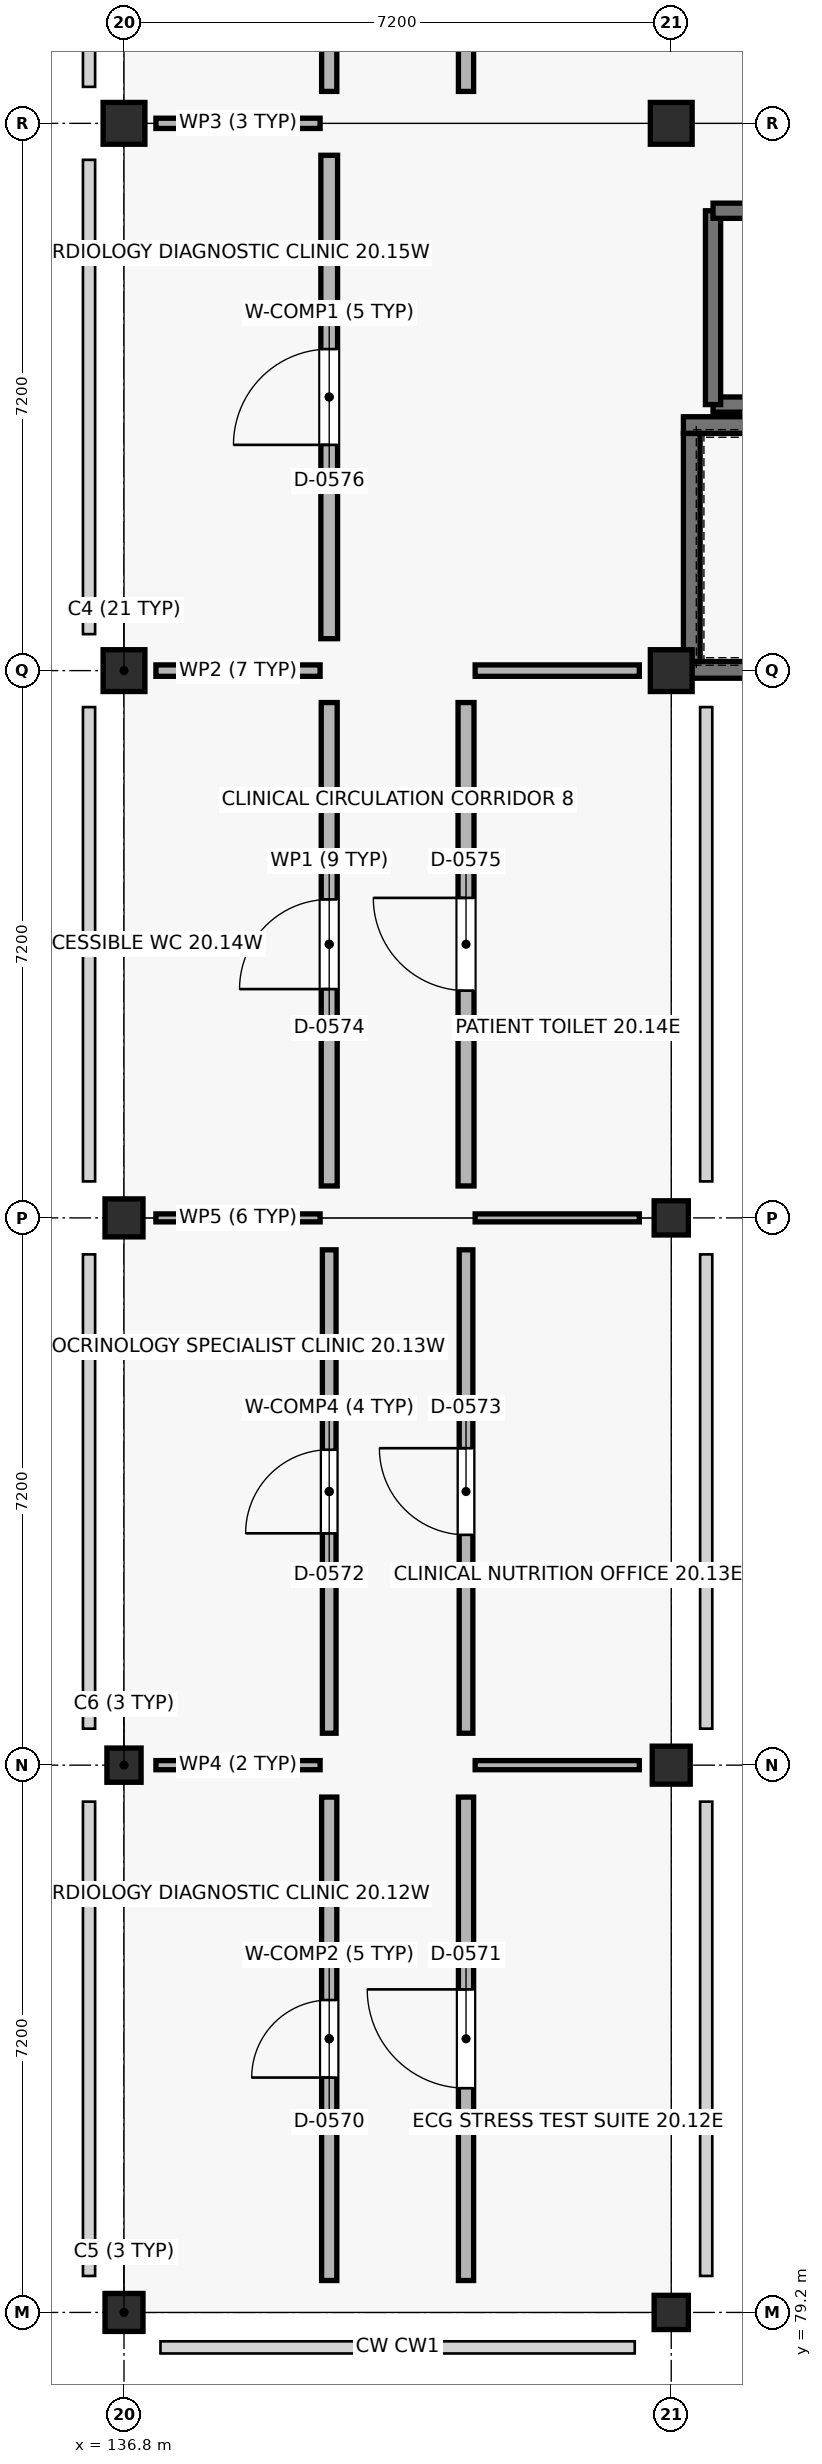
"""IFC4 building model, lengths in metres.
Left out: names, types, materials, properties, quantities, classifications, styles, units other than length and angle.
Written with IfcOpenShell. Run it as: python <this file> out.ifc"""

import sys

from ifc_helpers import new_model, si_unit, direction, frame, frame_2d, origin, origin_2d, place, context, subcontext, project, spatial, rectangle, extrude, element, fill, save


model = new_model("IFC4")
c1 = context("Model", 3, precision=1e-05, world=origin(), true_north=direction((0.0, 1.0)))
c2 = subcontext(c1, "Body", "Model", "MODEL_VIEW")
j1 = project(units=[si_unit("LENGTHUNIT", "METRE"), si_unit("PLANEANGLEUNIT", "RADIAN")], contexts=[c1])
p1 = place(None, origin())
s1 = spatial("IfcSite", under=j1, at=p1, CompositionType="ELEMENT")
p2 = place(p1, origin())
s2 = spatial("IfcBuilding", under=s1, at=p2, CompositionType="ELEMENT")
p3 = place(p2, frame((0.0, 0.0, 13.5)))
s3 = spatial("IfcBuildingStorey", under=s2, at=p3, CompositionType="ELEMENT", Elevation=13.5)
p4 = place(p3, frame((136.8, 79.2, 0.0), z_axis=(0.0, 0.0, 1.0), x_axis=(1.0, 0.0, 0.0)))
e1 = element("IfcColumn", 1, at=p4, inside=s3, PredefinedType="COLUMN", context=c2, shape_type="SweptSolid", body=[
    extrude(rectangle(XDim=0.5, YDim=0.5, at=origin_2d()), origin(), (0.0, 0.0, 1.0), 3.83),
])
p5 = place(p3, frame((136.8, 86.4, 0.0), z_axis=(0.0, 0.0, 1.0), x_axis=(1.0, 0.0, 0.0)))
e2 = element("IfcColumn", 2, at=p5, inside=s3, PredefinedType="COLUMN", context=c2, shape_type="SweptSolid", body=[
    extrude(rectangle(XDim=0.45, YDim=0.45, at=origin_2d()), origin(), (0.0, 0.0, 1.0), 3.83),
])
p6 = place(p3, frame((136.8, 93.6, 0.0), z_axis=(0.0, 0.0, 1.0), x_axis=(1.0, 0.0, 0.0)))
e3 = element("IfcColumn", 3, at=p6, inside=s3, PredefinedType="COLUMN", context=c2, shape_type="SweptSolid", body=[
    extrude(rectangle(XDim=0.5, YDim=0.5, at=origin_2d()), origin(), (0.0, 0.0, 1.0), 3.83),
])
for number, where, z_axis, x_axis in (
    (4, (136.8, 100.8, 0.0), (0.0, 0.0, 1.0), (1.0, 0.0, 0.0)),
    (5, (136.8, 108.0, 0.0), (0.0, 0.0, 1.0), (1.0, 0.0, 0.0)),
):
    element("IfcColumn", number, at=place(p3, frame(where, z_axis=z_axis, x_axis=x_axis)), inside=s3, PredefinedType="COLUMN", context=c2, shape_type="SweptSolid", body=[
        extrude(rectangle(XDim=0.55, YDim=0.55, at=origin_2d()), origin(), (0.0, 0.0, 1.0), 4.05),
    ])
p7 = place(p3, frame((144.0, 79.2, 0.0), z_axis=(0.0, 0.0, 1.0), x_axis=(1.0, 0.0, 0.0)))
e6 = element("IfcColumn", 6, at=p7, inside=s3, PredefinedType="COLUMN", context=c2, shape_type="SweptSolid", body=[
    extrude(rectangle(XDim=0.45, YDim=0.45, at=origin_2d()), origin(), (0.0, 0.0, 1.0), 3.83),
])
p8 = place(p3, frame((144.0, 86.4, 0.0), z_axis=(0.0, 0.0, 1.0), x_axis=(1.0, 0.0, 0.0)))
e7 = element("IfcColumn", 7, at=p8, inside=s3, PredefinedType="COLUMN", context=c2, shape_type="SweptSolid", body=[
    extrude(rectangle(XDim=0.5, YDim=0.5, at=origin_2d()), origin(), (0.0, 0.0, 1.0), 3.83),
])
p9 = place(p3, frame((144.0, 93.6, 0.0), z_axis=(0.0, 0.0, 1.0), x_axis=(1.0, 0.0, 0.0)))
e8 = element("IfcColumn", 8, at=p9, inside=s3, PredefinedType="COLUMN", context=c2, shape_type="SweptSolid", body=[
    extrude(rectangle(XDim=0.45, YDim=0.45, at=origin_2d()), origin(), (0.0, 0.0, 1.0), 3.83),
])
for number, where, z_axis, x_axis in (
    (9, (144.0, 100.8, 0.0), (0.0, 0.0, 1.0), (1.0, 0.0, 0.0)),
    (10, (144.0, 108.0, 0.0), (0.0, 0.0, 1.0), (1.0, 0.0, 0.0)),
):
    element("IfcColumn", number, at=place(p3, frame(where, z_axis=z_axis, x_axis=x_axis)), inside=s3, PredefinedType="COLUMN", context=c2, shape_type="SweptSolid", body=[
        extrude(rectangle(XDim=0.55, YDim=0.55, at=origin_2d()), origin(), (0.0, 0.0, 1.0), 4.05),
    ])
p10 = place(p3, frame((144.16, 100.81, 0.0), z_axis=(0.0, 0.0, 1.0), x_axis=(1.0, 0.0, 0.0)))
e11 = element("IfcWall", 11, at=p10, inside=s3, PredefinedType="SHEAR", context=c2, shape_type="SweptSolid", body=[
    extrude(rectangle(XDim=6.88, YDim=0.22, at=frame_2d((3.44, 0.0))), origin(), (0.0, 0.0, 1.0), 3.79),
])
p11 = place(p3, frame((144.16, 104.03, 0.0), z_axis=(0.0, 0.0, 1.0), x_axis=(1.0, 0.0, 0.0)))
e12 = element("IfcWall", 12, at=p11, inside=s3, PredefinedType="SHEAR", context=c2, shape_type="SweptSolid", body=[
    extrude(rectangle(XDim=6.88, YDim=0.22, at=frame_2d((3.44, 0.0))), origin(), (0.0, 0.0, 1.0), 3.79),
])
p12 = place(p11, frame((5.25, 0.0, 0.0)))
e13 = element("IfcOpeningElement", 13, at=p12, cuts=e12, PredefinedType="OPENING", context=c2, shape_type="SweptSolid", body=[
    extrude(rectangle(XDim=1.2, YDim=2.15, at=frame_2d((0.6, 1.075))), frame((0.0, 0.12, 0.0), z_axis=(0.0, -1.0, 0.0), x_axis=(1.0, 0.0, 0.0)), (0.0, 0.0, 1.0), 0.24),
])
p13 = place(p3, frame((144.27, 100.92, 0.0), z_axis=(0.0, 0.0, 1.0), x_axis=(0.0, 1.0, 0.0)))
e14 = element("IfcWall", 14, at=p13, inside=s3, PredefinedType="SHEAR", context=c2, shape_type="SweptSolid", body=[
    extrude(rectangle(XDim=3.0, YDim=0.22, at=frame_2d((1.5, 0.0))), origin(), (0.0, 0.0, 1.0), 3.79),
])
p14 = place(p3, frame((144.55, 104.3, 0.0), z_axis=(0.0, 0.0, 1.0), x_axis=(1.0, 0.0, 0.0)))
e15 = element("IfcWall", 15, at=p14, inside=s3, PredefinedType="SHEAR", context=c2, shape_type="SweptSolid", body=[
    extrude(rectangle(XDim=2.1, YDim=0.2, at=frame_2d((1.05, 0.0))), origin(), (0.0, 0.0, 1.0), 3.79),
])
p15 = place(p3, frame((144.55, 104.3, 0.0), z_axis=(0.0, 0.0, 1.0), x_axis=(0.0, 1.0, 0.0)))
e16 = element("IfcWall", 16, at=p15, inside=s3, PredefinedType="SHEAR", context=c2, shape_type="SweptSolid", body=[
    extrude(rectangle(XDim=2.55, YDim=0.2, at=frame_2d((1.275, 0.0))), origin(), (0.0, 0.0, 1.0), 3.79),
])
p16 = place(p3, frame((144.55, 106.85, 0.0), z_axis=(0.0, 0.0, 1.0), x_axis=(1.0, 0.0, 0.0)))
e17 = element("IfcWall", 17, at=p16, inside=s3, PredefinedType="SHEAR", context=c2, shape_type="SweptSolid", body=[
    extrude(rectangle(XDim=2.1, YDim=0.2, at=frame_2d((1.05, 0.0))), origin(), (0.0, 0.0, 1.0), 3.79),
])
p17 = place(p3, frame((139.5, 79.62, 0.0), z_axis=(0.0, 0.0, 1.0), x_axis=(0.0, 1.0, 0.0)))
e18 = element("IfcWall", 18, at=p17, inside=s3, PredefinedType="SOLIDWALL", context=c2, shape_type="SweptSolid", body=[
    extrude(rectangle(XDim=6.36, YDim=0.2, at=frame_2d((3.18, 0.0))), origin(), (0.0, 0.0, 1.0), 2.93),
])
p18 = place(p17, frame((2.67, 0.0, 0.0)))
e19 = element("IfcOpeningElement", 19, at=p18, cuts=e18, PredefinedType="OPENING", context=c2, shape_type="SweptSolid", body=[
    extrude(rectangle(XDim=1.02, YDim=2.04, at=frame_2d((0.51, 1.02))), frame((0.0, 0.11, 0.0), z_axis=(0.0, -1.0, 0.0), x_axis=(1.0, 0.0, 0.0)), (0.0, 0.0, 1.0), 0.22),
])
p19 = place(p3, frame((137.22, 86.4, 0.0), z_axis=(0.0, 0.0, 1.0), x_axis=(1.0, 0.0, 0.0)))
e20 = element("IfcWall", 20, at=p19, inside=s3, PredefinedType="PARTITIONING", context=c2, shape_type="SweptSolid", body=[
    extrude(rectangle(XDim=2.16, YDim=0.12, at=frame_2d((1.08, 0.0))), origin(), (0.0, 0.0, 1.0), 2.93),
])
p20 = place(p3, frame((141.3, 79.62, 0.0), z_axis=(0.0, 0.0, 1.0), x_axis=(0.0, 1.0, 0.0)))
e21 = element("IfcWall", 21, at=p20, inside=s3, PredefinedType="SOLIDWALL", context=c2, shape_type="SweptSolid", body=[
    extrude(rectangle(XDim=6.36, YDim=0.2, at=frame_2d((3.18, 0.0))), origin(), (0.0, 0.0, 1.0), 2.93),
])
p21 = place(p20, frame((2.53, 0.0, 0.0)))
e22 = element("IfcOpeningElement", 22, at=p21, cuts=e21, PredefinedType="OPENING", context=c2, shape_type="SweptSolid", body=[
    extrude(rectangle(XDim=1.3, YDim=2.15, at=frame_2d((0.65, 1.075))), frame((0.0, 0.11, 0.0), z_axis=(0.0, -1.0, 0.0), x_axis=(1.0, 0.0, 0.0)), (0.0, 0.0, 1.0), 0.22),
])
p22 = place(p3, frame((141.42, 86.4, 0.0), z_axis=(0.0, 0.0, 1.0), x_axis=(1.0, 0.0, 0.0)))
e23 = element("IfcWall", 23, at=p22, inside=s3, PredefinedType="PARTITIONING", context=c2, shape_type="SweptSolid", body=[
    extrude(rectangle(XDim=2.16, YDim=0.12, at=frame_2d((1.08, 0.0))), origin(), (0.0, 0.0, 1.0), 2.93),
])
p23 = place(p3, frame((139.5, 86.82, 0.0), z_axis=(0.0, 0.0, 1.0), x_axis=(0.0, 1.0, 0.0)))
e24 = element("IfcWall", 24, at=p23, inside=s3, PredefinedType="PARTITIONING", context=c2, shape_type="SweptSolid", body=[
    extrude(rectangle(XDim=6.36, YDim=0.18, at=frame_2d((3.18, 0.0))), origin(), (0.0, 0.0, 1.0), 2.93),
])
p24 = place(p23, frame((2.63, 0.0, 0.0)))
e25 = element("IfcOpeningElement", 25, at=p24, cuts=e24, PredefinedType="OPENING", context=c2, shape_type="SweptSolid", body=[
    extrude(rectangle(XDim=1.1, YDim=2.04, at=frame_2d((0.55, 1.02))), frame((0.0, 0.1, 0.0), z_axis=(0.0, -1.0, 0.0), x_axis=(1.0, 0.0, 0.0)), (0.0, 0.0, 1.0), 0.2),
])
p25 = place(p3, frame((137.22, 93.6, 0.0), z_axis=(0.0, 0.0, 1.0), x_axis=(1.0, 0.0, 0.0)))
e26 = element("IfcWall", 26, at=p25, inside=s3, PredefinedType="PARTITIONING", context=c2, shape_type="SweptSolid", body=[
    extrude(rectangle(XDim=2.16, YDim=0.105, at=frame_2d((1.08, 0.0))), origin(), (0.0, 0.0, 1.0), 2.93),
])
p26 = place(p3, frame((141.3, 86.82, 0.0), z_axis=(0.0, 0.0, 1.0), x_axis=(0.0, 1.0, 0.0)))
e27 = element("IfcWall", 27, at=p26, inside=s3, PredefinedType="PARTITIONING", context=c2, shape_type="SweptSolid", body=[
    extrude(rectangle(XDim=6.36, YDim=0.18, at=frame_2d((3.18, 0.0))), origin(), (0.0, 0.0, 1.0), 2.93),
])
p27 = place(p26, frame((2.61, 0.0, 0.0)))
e28 = element("IfcOpeningElement", 28, at=p27, cuts=e27, PredefinedType="OPENING", context=c2, shape_type="SweptSolid", body=[
    extrude(rectangle(XDim=1.14, YDim=2.04, at=frame_2d((0.57, 1.02))), frame((0.0, 0.1, 0.0), z_axis=(0.0, -1.0, 0.0), x_axis=(1.0, 0.0, 0.0)), (0.0, 0.0, 1.0), 0.2),
])
p28 = place(p3, frame((141.42, 93.6, 0.0), z_axis=(0.0, 0.0, 1.0), x_axis=(1.0, 0.0, 0.0)))
e29 = element("IfcWall", 29, at=p28, inside=s3, PredefinedType="PARTITIONING", context=c2, shape_type="SweptSolid", body=[
    extrude(rectangle(XDim=2.16, YDim=0.105, at=frame_2d((1.08, 0.0))), origin(), (0.0, 0.0, 1.0), 2.93),
])
p29 = place(p3, frame((139.5, 94.02, 0.0), z_axis=(0.0, 0.0, 1.0), x_axis=(0.0, 1.0, 0.0)))
e30 = element("IfcWall", 30, at=p29, inside=s3, PredefinedType="PLUMBINGWALL", context=c2, shape_type="SweptSolid", body=[
    extrude(rectangle(XDim=6.36, YDim=0.21, at=frame_2d((3.18, 0.0))), origin(), (0.0, 0.0, 1.0), 2.93),
])
p30 = place(p29, frame((2.59, 0.0, 0.0)))
e31 = element("IfcOpeningElement", 31, at=p30, cuts=e30, PredefinedType="OPENING", context=c2, shape_type="SweptSolid", body=[
    extrude(rectangle(XDim=1.18, YDim=2.04, at=frame_2d((0.59, 1.02))), frame((0.0, 0.115, 0.0), z_axis=(0.0, -1.0, 0.0), x_axis=(1.0, 0.0, 0.0)), (0.0, 0.0, 1.0), 0.23),
])
p31 = place(p3, frame((137.22, 100.8, 0.0), z_axis=(0.0, 0.0, 1.0), x_axis=(1.0, 0.0, 0.0)))
e32 = element("IfcWall", 32, at=p31, inside=s3, PredefinedType="PARTITIONING", context=c2, shape_type="SweptSolid", body=[
    extrude(rectangle(XDim=2.16, YDim=0.15, at=frame_2d((1.08, 0.0))), origin(), (0.0, 0.0, 1.0), 2.93),
])
p32 = place(p3, frame((141.3, 94.02, 0.0), z_axis=(0.0, 0.0, 1.0), x_axis=(0.0, 1.0, 0.0)))
e33 = element("IfcWall", 33, at=p32, inside=s3, PredefinedType="PLUMBINGWALL", context=c2, shape_type="SweptSolid", body=[
    extrude(rectangle(XDim=6.36, YDim=0.21, at=frame_2d((3.18, 0.0))), origin(), (0.0, 0.0, 1.0), 2.93),
])
p33 = place(p32, frame((2.57, 0.0, 0.0)))
e34 = element("IfcOpeningElement", 34, at=p33, cuts=e33, PredefinedType="OPENING", context=c2, shape_type="SweptSolid", body=[
    extrude(rectangle(XDim=1.22, YDim=2.04, at=frame_2d((0.61, 1.02))), frame((0.0, 0.115, 0.0), z_axis=(0.0, -1.0, 0.0), x_axis=(1.0, 0.0, 0.0)), (0.0, 0.0, 1.0), 0.23),
])
p34 = place(p3, frame((141.42, 100.8, 0.0), z_axis=(0.0, 0.0, 1.0), x_axis=(1.0, 0.0, 0.0)))
e35 = element("IfcWall", 35, at=p34, inside=s3, PredefinedType="PARTITIONING", context=c2, shape_type="SweptSolid", body=[
    extrude(rectangle(XDim=2.16, YDim=0.15, at=frame_2d((1.08, 0.0))), origin(), (0.0, 0.0, 1.0), 2.93),
])
p35 = place(p3, frame((139.5, 101.22, 0.0), z_axis=(0.0, 0.0, 1.0), x_axis=(0.0, 1.0, 0.0)))
e36 = element("IfcWall", 36, at=p35, inside=s3, PredefinedType="SOLIDWALL", context=c2, shape_type="SweptSolid", body=[
    extrude(rectangle(XDim=6.36, YDim=0.22, at=frame_2d((3.18, 0.0))), origin(), (0.0, 0.0, 1.0), 2.93),
])
p36 = place(p35, frame((2.55, 0.0, 0.0)))
e37 = element("IfcOpeningElement", 37, at=p36, cuts=e36, PredefinedType="OPENING", context=c2, shape_type="SweptSolid", body=[
    extrude(rectangle(XDim=1.26, YDim=2.04, at=frame_2d((0.63, 1.02))), frame((0.0, 0.12, 0.0), z_axis=(0.0, -1.0, 0.0), x_axis=(1.0, 0.0, 0.0)), (0.0, 0.0, 1.0), 0.24),
])
p37 = place(p3, frame((137.22, 108.0, 0.0), z_axis=(0.0, 0.0, 1.0), x_axis=(1.0, 0.0, 0.0)))
e38 = element("IfcWall", 38, at=p37, inside=s3, PredefinedType="PARTITIONING", context=c2, shape_type="SweptSolid", body=[
    extrude(rectangle(XDim=2.16, YDim=0.135, at=frame_2d((1.08, 0.0))), origin(), (0.0, 0.0, 1.0), 2.93),
])
p38 = place(p3, frame((139.5, 108.42, 0.0), z_axis=(0.0, 0.0, 1.0), x_axis=(0.0, 1.0, 0.0)))
e39 = element("IfcWall", 39, at=p38, inside=s3, PredefinedType="SOLIDWALL", context=c2, shape_type="SweptSolid", body=[
    extrude(rectangle(XDim=6.36, YDim=0.2, at=frame_2d((3.18, 0.0))), origin(), (0.0, 0.0, 1.0), 2.93),
])
p39 = place(p38, frame((2.53, 0.0, 0.0)))
e40 = element("IfcOpeningElement", 40, at=p39, cuts=e39, PredefinedType="OPENING", context=c2, shape_type="SweptSolid", body=[
    extrude(rectangle(XDim=1.3, YDim=2.15, at=frame_2d((0.65, 1.075))), frame((0.0, 0.11, 0.0), z_axis=(0.0, -1.0, 0.0), x_axis=(1.0, 0.0, 0.0)), (0.0, 0.0, 1.0), 0.22),
])
p40 = place(p3, frame((141.3, 108.42, 0.0), z_axis=(0.0, 0.0, 1.0), x_axis=(0.0, 1.0, 0.0)))
e41 = element("IfcWall", 41, at=p40, inside=s3, PredefinedType="SOLIDWALL", context=c2, shape_type="SweptSolid", body=[
    extrude(rectangle(XDim=6.36, YDim=0.2, at=frame_2d((3.18, 0.0))), origin(), (0.0, 0.0, 1.0), 2.93),
])
p41 = place(p40, frame((2.51, 0.0, 0.0)))
e42 = element("IfcOpeningElement", 42, at=p41, cuts=e41, PredefinedType="OPENING", context=c2, shape_type="SweptSolid", body=[
    extrude(rectangle(XDim=1.34, YDim=2.04, at=frame_2d((0.67, 1.02))), frame((0.0, 0.11, 0.0), z_axis=(0.0, -1.0, 0.0), x_axis=(1.0, 0.0, 0.0)), (0.0, 0.0, 1.0), 0.22),
])
p42 = place(p18, origin())
e43 = element("IfcDoor", 43, at=p42, inside=s3, OperationType="SINGLE_SWING_LEFT", PredefinedType="DOOR", context=c2, shape_type="SweptSolid", body=[
    extrude(rectangle(XDim=1.02, YDim=2.04, at=frame_2d((0.51, 1.02))), frame((0.0, 0.025, 0.0), z_axis=(0.0, -1.0, 0.0), x_axis=(1.0, 0.0, 0.0)), (0.0, 0.0, 1.0), 0.05),
])
fill(e19, e43)
p43 = place(p21, origin())
e44 = element("IfcDoor", 44, at=p43, inside=s3, OperationType="SINGLE_SWING_RIGHT", PredefinedType="DOOR", context=c2, shape_type="SweptSolid", body=[
    extrude(rectangle(XDim=1.3, YDim=2.15, at=frame_2d((0.65, 1.075))), frame((0.0, 0.025, 0.0), z_axis=(0.0, -1.0, 0.0), x_axis=(1.0, 0.0, 0.0)), (0.0, 0.0, 1.0), 0.05),
])
fill(e22, e44)
p44 = place(p24, origin())
e45 = element("IfcDoor", 45, at=p44, inside=s3, OperationType="SINGLE_SWING_LEFT", PredefinedType="DOOR", context=c2, shape_type="SweptSolid", body=[
    extrude(rectangle(XDim=1.1, YDim=2.04, at=frame_2d((0.55, 1.02))), frame((0.0, 0.025, 0.0), z_axis=(0.0, -1.0, 0.0), x_axis=(1.0, 0.0, 0.0)), (0.0, 0.0, 1.0), 0.05),
])
fill(e25, e45)
p45 = place(p27, origin())
e46 = element("IfcDoor", 46, at=p45, inside=s3, OperationType="SINGLE_SWING_RIGHT", PredefinedType="DOOR", context=c2, shape_type="SweptSolid", body=[
    extrude(rectangle(XDim=1.14, YDim=2.04, at=frame_2d((0.57, 1.02))), frame((0.0, 0.025, 0.0), z_axis=(0.0, -1.0, 0.0), x_axis=(1.0, 0.0, 0.0)), (0.0, 0.0, 1.0), 0.05),
])
fill(e28, e46)
p46 = place(p30, origin())
e47 = element("IfcDoor", 47, at=p46, inside=s3, OperationType="SINGLE_SWING_LEFT", PredefinedType="DOOR", context=c2, shape_type="SweptSolid", body=[
    extrude(rectangle(XDim=1.18, YDim=2.04, at=frame_2d((0.59, 1.02))), frame((0.0, 0.025, 0.0), z_axis=(0.0, -1.0, 0.0), x_axis=(1.0, 0.0, 0.0)), (0.0, 0.0, 1.0), 0.05),
])
fill(e31, e47)
p47 = place(p33, origin())
e48 = element("IfcDoor", 48, at=p47, inside=s3, OperationType="SINGLE_SWING_RIGHT", PredefinedType="DOOR", context=c2, shape_type="SweptSolid", body=[
    extrude(rectangle(XDim=1.22, YDim=2.04, at=frame_2d((0.61, 1.02))), frame((0.0, 0.025, 0.0), z_axis=(0.0, -1.0, 0.0), x_axis=(1.0, 0.0, 0.0)), (0.0, 0.0, 1.0), 0.05),
])
fill(e34, e48)
p48 = place(p36, origin())
e49 = element("IfcDoor", 49, at=p48, inside=s3, OperationType="SINGLE_SWING_LEFT", PredefinedType="DOOR", context=c2, shape_type="SweptSolid", body=[
    extrude(rectangle(XDim=1.26, YDim=2.04, at=frame_2d((0.63, 1.02))), frame((0.0, 0.025, 0.0), z_axis=(0.0, -1.0, 0.0), x_axis=(1.0, 0.0, 0.0)), (0.0, 0.0, 1.0), 0.05),
])
fill(e37, e49)
save(model, sys.argv[1])
